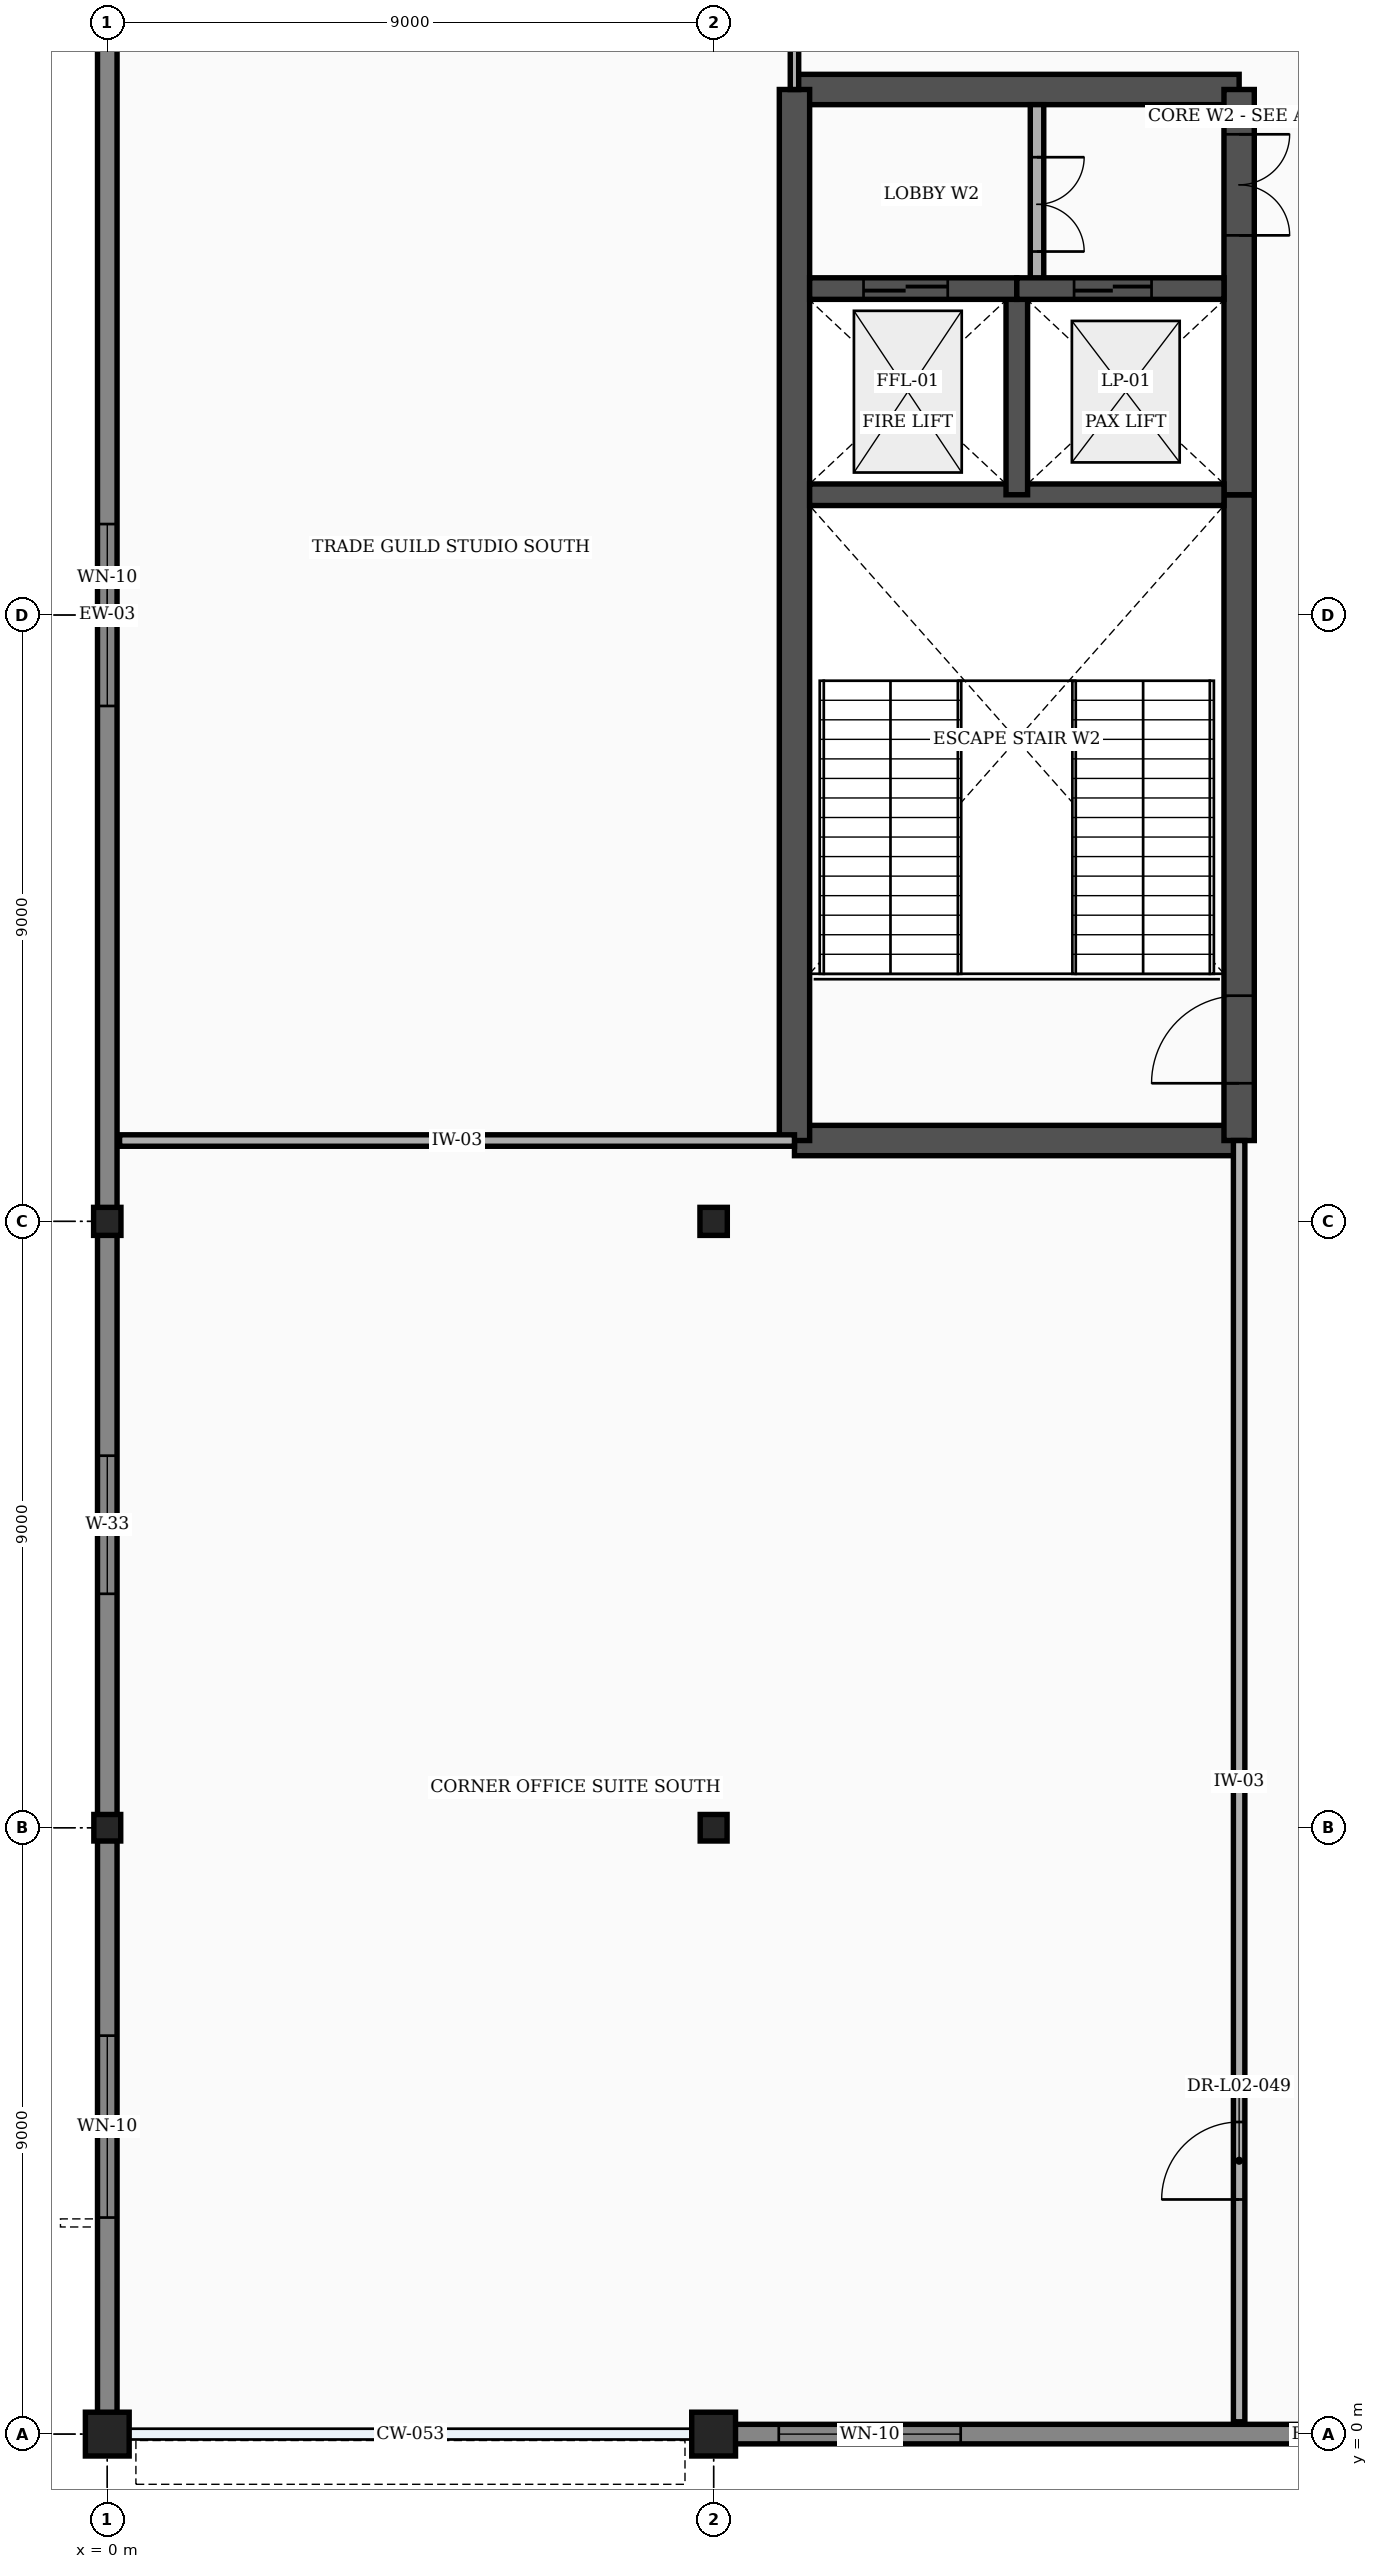
"""IFC4 building model, lengths in metres.
Left out: names, types, materials, properties, quantities, classifications, styles, units other than length and angle.
Written with IfcOpenShell. Run it as: python <this file> out.ifc"""

import sys

from ifc_helpers import new_model, si_unit, direction, frame, frame_2d, origin, origin_with_axes, origin_2d, place, context, subcontext, project, spatial, rectangle, i_section, extrude, element, fill, save


model = new_model("IFC4")
c1 = context("Model", 3, precision=1e-05, world=origin(), true_north=direction((0.0, 1.0)))
c2 = subcontext(c1, "Body", "Model", "MODEL_VIEW")
j1 = project(units=[si_unit("LENGTHUNIT", "METRE"), si_unit("PLANEANGLEUNIT", "RADIAN")], contexts=[c1])
p1 = place(None, origin())
s1 = spatial("IfcSite", under=j1, at=p1, CompositionType="ELEMENT")
p2 = place(p1, origin())
s2 = spatial("IfcBuilding", under=s1, at=p2, CompositionType="ELEMENT")
p3 = place(p2, frame((0.0, 0.0, 11.4)))
s3 = spatial("IfcBuildingStorey", under=s2, at=p3, CompositionType="ELEMENT", Elevation=11.4)
p4 = place(p3, origin_with_axes())
e1 = element("IfcColumn", 1, at=p4, inside=s3, PredefinedType="COLUMN", context=c2, shape_type="SweptSolid", body=[
    extrude(rectangle(XDim=0.65, YDim=0.65, at=origin_2d()), origin(), (0.0, 0.0, 1.0), 5.4),
])
p5 = place(p3, frame((0.0, 9.0, 0.0), z_axis=(0.0, 0.0, 1.0), x_axis=(1.0, 0.0, 0.0)))
e2 = element("IfcColumn", 2, at=p5, inside=s3, PredefinedType="COLUMN", context=c2, shape_type="SweptSolid", body=[
    extrude(i_section(OverallWidth=0.399, OverallDepth=0.394, WebThickness=0.023, FlangeThickness=0.037, at=origin_2d()), origin(), (0.0, 0.0, 1.0), 5.4),
])
p6 = place(p3, frame((0.0, 18.0, 0.0), z_axis=(0.0, 0.0, 1.0), x_axis=(1.0, 0.0, 0.0)))
e3 = element("IfcColumn", 3, at=p6, inside=s3, PredefinedType="COLUMN", context=c2, shape_type="SweptSolid", body=[
    extrude(i_section(OverallWidth=0.406, OverallDepth=0.416, WebThickness=0.03, FlangeThickness=0.048, at=origin_2d()), origin(), (0.0, 0.0, 1.0), 5.4),
])
p7 = place(p3, frame((9.0, 0.0, 0.0), z_axis=(0.0, 0.0, 1.0), x_axis=(1.0, 0.0, 0.0)))
e4 = element("IfcColumn", 4, at=p7, inside=s3, PredefinedType="COLUMN", context=c2, shape_type="SweptSolid", body=[
    extrude(rectangle(XDim=0.65, YDim=0.65, at=origin_2d()), origin(), (0.0, 0.0, 1.0), 5.4),
])
p8 = place(p3, frame((9.0, 9.0, 0.0), z_axis=(0.0, 0.0, 1.0), x_axis=(1.0, 0.0, 0.0)))
e5 = element("IfcColumn", 5, at=p8, inside=s3, PredefinedType="COLUMN", context=c2, shape_type="SweptSolid", body=[
    extrude(i_section(OverallWidth=0.399, OverallDepth=0.394, WebThickness=0.023, FlangeThickness=0.037, at=origin_2d()), origin(), (0.0, 0.0, 1.0), 5.4),
])
p9 = place(p3, frame((9.0, 18.0, 0.0), z_axis=(0.0, 0.0, 1.0), x_axis=(1.0, 0.0, 0.0)))
e6 = element("IfcColumn", 6, at=p9, inside=s3, PredefinedType="COLUMN", context=c2, shape_type="SweptSolid", body=[
    extrude(i_section(OverallWidth=0.406, OverallDepth=0.416, WebThickness=0.03, FlangeThickness=0.048, at=origin_2d()), origin(), (0.0, 0.0, 1.0), 5.4),
])
p10 = place(p3, frame((9.317, 0.0, 0.0), z_axis=(0.0, 0.0, 1.0), x_axis=(1.0, 0.0, 0.0)))
e7 = element("IfcWall", 7, at=p10, inside=s3, PredefinedType="STANDARD", context=c2, shape_type="SweptSolid", body=[
    extrude(rectangle(XDim=17.366, YDim=0.29, at=frame_2d((8.683, 0.0))), origin(), (0.0, 0.0, 1.0), 4.388),
])
p11 = place(p10, frame((0.65, 0.0, 0.85)))
e8 = element("IfcOpeningElement", 8, at=p11, cuts=e7, PredefinedType="OPENING", context=c2, shape_type="SweptSolid", body=[
    extrude(rectangle(XDim=2.7, YDim=2.4, at=frame_2d((1.35, 1.2))), frame((0.0, 0.157, 0.0), z_axis=(0.0, -1.0, 0.0), x_axis=(1.0, 0.0, 0.0)), (0.0, 0.0, 1.0), 0.314),
])
p12 = place(p3, frame((0.0, 0.317, 0.0), z_axis=(0.0, 0.0, 1.0), x_axis=(0.0, 1.0, 0.0)))
e9 = element("IfcWall", 9, at=p12, inside=s3, PredefinedType="STANDARD", context=c2, shape_type="SweptSolid", body=[
    extrude(rectangle(XDim=8.495, YDim=0.29, at=frame_2d((4.247, 0.0))), origin(), (0.0, 0.0, 1.0), 4.9),
])
p13 = place(p12, frame((2.897, 0.0, 0.85)))
e10 = element("IfcOpeningElement", 10, at=p13, cuts=e9, PredefinedType="OPENING", context=c2, shape_type="SweptSolid", body=[
    extrude(rectangle(XDim=2.7, YDim=2.4, at=frame_2d((1.35, 1.2))), frame((0.0, 0.157, 0.0), z_axis=(0.0, -1.0, 0.0), x_axis=(1.0, 0.0, 0.0)), (0.0, 0.0, 1.0), 0.314),
])
p14 = place(p3, frame((0.0, 9.188, 0.0), z_axis=(0.0, 0.0, 1.0), x_axis=(0.0, 1.0, 0.0)))
e11 = element("IfcWall", 11, at=p14, inside=s3, PredefinedType="STANDARD", context=c2, shape_type="SweptSolid", body=[
    extrude(rectangle(XDim=8.617, YDim=0.29, at=frame_2d((4.309, 0.0))), origin(), (0.0, 0.0, 1.0), 4.9),
])
p15 = place(p14, frame((3.284, 0.0, 0.85)))
e12 = element("IfcOpeningElement", 12, at=p15, cuts=e11, PredefinedType="OPENING", context=c2, shape_type="SweptSolid", body=[
    extrude(rectangle(XDim=2.05, YDim=1.9, at=frame_2d((1.025, 0.95))), frame((0.0, 0.157, 0.0), z_axis=(0.0, -1.0, 0.0), x_axis=(1.0, 0.0, 0.0)), (0.0, 0.0, 1.0), 0.314),
])
p16 = place(p3, frame((0.0, 18.194, 0.0), z_axis=(0.0, 0.0, 1.0), x_axis=(0.0, 1.0, 0.0)))
e13 = element("IfcWall", 13, at=p16, inside=s3, PredefinedType="STANDARD", context=c2, shape_type="SweptSolid", body=[
    extrude(rectangle(XDim=17.612, YDim=0.29, at=frame_2d((8.806, 0.0))), origin(), (0.0, 0.0, 1.0), 4.467),
])
p17 = place(p16, frame((7.456, 0.0, 0.85)))
e14 = element("IfcOpeningElement", 14, at=p17, cuts=e13, PredefinedType="OPENING", context=c2, shape_type="SweptSolid", body=[
    extrude(rectangle(XDim=2.7, YDim=2.4, at=frame_2d((1.35, 1.2))), frame((0.0, 0.157, 0.0), z_axis=(0.0, -1.0, 0.0), x_axis=(1.0, 0.0, 0.0)), (0.0, 0.0, 1.0), 0.314),
])
for number, where, z_axis, x_axis in (
    (15, (10.2, 19.2, 0.0), (0.0, 0.0, 1.0), (1.0, 0.0, 0.0)),
    (16, (10.2, 34.8, 0.0), (0.0, 0.0, 1.0), (1.0, 0.0, 0.0)),
):
    element("IfcWall", number, at=place(p3, frame(where, z_axis=z_axis, x_axis=x_axis)), inside=s3, PredefinedType="SHEAR", context=c2, shape_type="SweptSolid", body=[
        extrude(rectangle(XDim=6.6, YDim=0.45, at=frame_2d((3.3, 0.0))), origin(), (0.0, 0.0, 1.0), 5.15),
    ])
p18 = place(p3, frame((10.2, 19.2, 0.0), z_axis=(0.0, 0.0, 1.0), x_axis=(0.0, 1.0, 0.0)))
e17 = element("IfcWall", 17, at=p18, inside=s3, PredefinedType="SHEAR", context=c2, shape_type="SweptSolid", body=[
    extrude(rectangle(XDim=15.6, YDim=0.45, at=frame_2d((7.8, 0.0))), origin(), (0.0, 0.0, 1.0), 5.15),
])
p19 = place(p3, frame((16.8, 19.2, 0.0), z_axis=(0.0, 0.0, 1.0), x_axis=(0.0, 1.0, 0.0)))
e18 = element("IfcWall", 18, at=p19, inside=s3, PredefinedType="SHEAR", context=c2, shape_type="SweptSolid", body=[
    extrude(rectangle(XDim=9.585, YDim=0.45, at=frame_2d((4.792, 0.0))), origin(), (0.0, 0.0, 1.0), 5.15),
])
p20 = place(p19, frame((0.85, 0.0, 0.0)))
e19 = element("IfcOpeningElement", 19, at=p20, cuts=e18, PredefinedType="OPENING", context=c2, shape_type="SweptSolid", body=[
    extrude(rectangle(XDim=1.3, YDim=2.2, at=frame_2d((0.65, 1.1))), frame((0.0, 0.237, 0.0), z_axis=(0.0, -1.0, 0.0), x_axis=(1.0, 0.0, 0.0)), (0.0, 0.0, 1.0), 0.474),
])
p21 = place(p3, frame((16.8, 28.785, 0.0), z_axis=(0.0, 0.0, 1.0), x_axis=(0.0, 1.0, 0.0)))
e20 = element("IfcWall", 20, at=p21, inside=s3, PredefinedType="SHEAR", context=c2, shape_type="SweptSolid", body=[
    extrude(rectangle(XDim=6.015, YDim=0.45, at=frame_2d((3.008, 0.0))), origin(), (0.0, 0.0, 1.0), 5.15),
])
p22 = place(p21, frame((3.85, 0.0, 0.0)))
e21 = element("IfcOpeningElement", 21, at=p22, cuts=e20, PredefinedType="OPENING", context=c2, shape_type="SweptSolid", body=[
    extrude(rectangle(XDim=1.5, YDim=2.2, at=frame_2d((0.75, 1.1))), frame((0.0, 0.237, 0.0), z_axis=(0.0, -1.0, 0.0), x_axis=(1.0, 0.0, 0.0)), (0.0, 0.0, 1.0), 0.474),
])
p23 = place(p3, frame((10.425, 28.785, 0.0), z_axis=(0.0, 0.0, 1.0), x_axis=(1.0, 0.0, 0.0)))
e22 = element("IfcWall", 22, at=p23, inside=s3, PredefinedType="SHEAR", context=c2, shape_type="SweptSolid", body=[
    extrude(rectangle(XDim=6.15, YDim=0.32, at=frame_2d((3.075, 0.0))), origin(), (0.0, 0.0, 1.0), 5.15),
])
p24 = place(p3, frame((13.5, 28.785, 0.0), z_axis=(0.0, 0.0, 1.0), x_axis=(0.0, 1.0, 0.0)))
e23 = element("IfcWall", 23, at=p24, inside=s3, PredefinedType="SHEAR", context=c2, shape_type="SweptSolid", body=[
    extrude(rectangle(XDim=3.06, YDim=0.32, at=frame_2d((1.53, 0.0))), origin(), (0.0, 0.0, 1.0), 5.15),
])
p25 = place(p3, frame((13.8, 31.845, 0.0), z_axis=(0.0, 0.0, 1.0), x_axis=(0.0, 1.0, 0.0)))
e24 = element("IfcWall", 24, at=p25, inside=s3, PredefinedType="PARTITIONING", context=c2, shape_type="SweptSolid", body=[
    extrude(rectangle(XDim=2.73, YDim=0.2, at=frame_2d((1.365, 0.0))), origin(), (0.0, 0.0, 1.0), 5.15),
])
p26 = place(p25, frame((0.55, 0.0, 0.0)))
e25 = element("IfcOpeningElement", 25, at=p26, cuts=e24, PredefinedType="OPENING", context=c2, shape_type="SweptSolid", body=[
    extrude(rectangle(XDim=1.4, YDim=2.25, at=frame_2d((0.7, 1.125))), frame((0.0, 0.112, 0.0), z_axis=(0.0, -1.0, 0.0), x_axis=(1.0, 0.0, 0.0)), (0.0, 0.0, 1.0), 0.224),
])
p27 = place(p3, frame((10.425, 31.845, 0.0), z_axis=(0.0, 0.0, 1.0), x_axis=(1.0, 0.0, 0.0)))
e26 = element("IfcWall", 26, at=p27, inside=s3, PredefinedType="SHEAR", context=c2, shape_type="SweptSolid", body=[
    extrude(rectangle(XDim=3.075, YDim=0.32, at=frame_2d((1.538, 0.0))), origin(), (0.0, 0.0, 1.0), 5.15),
])
p28 = place(p27, frame((0.8, 0.0, 0.0)))
e27 = element("IfcOpeningElement", 27, at=p28, cuts=e26, PredefinedType="OPENING", context=c2, shape_type="SweptSolid", body=[
    extrude(rectangle(XDim=1.25, YDim=2.25, at=frame_2d((0.625, 1.125))), frame((0.0, 0.172, 0.0), z_axis=(0.0, -1.0, 0.0), x_axis=(1.0, 0.0, 0.0)), (0.0, 0.0, 1.0), 0.344),
])
p29 = place(p3, frame((13.5, 31.845, 0.0), z_axis=(0.0, 0.0, 1.0), x_axis=(1.0, 0.0, 0.0)))
e28 = element("IfcWall", 28, at=p29, inside=s3, PredefinedType="SHEAR", context=c2, shape_type="SweptSolid", body=[
    extrude(rectangle(XDim=3.075, YDim=0.32, at=frame_2d((1.538, 0.0))), origin(), (0.0, 0.0, 1.0), 5.15),
])
p30 = place(p29, frame((0.85, 0.0, 0.0)))
e29 = element("IfcOpeningElement", 29, at=p30, cuts=e28, PredefinedType="OPENING", context=c2, shape_type="SweptSolid", body=[
    extrude(rectangle(XDim=1.15, YDim=2.2, at=frame_2d((0.575, 1.1))), frame((0.0, 0.172, 0.0), z_axis=(0.0, -1.0, 0.0), x_axis=(1.0, 0.0, 0.0)), (0.0, 0.0, 1.0), 0.344),
])
p31 = place(p3, frame((10.2, 34.8, 0.0), z_axis=(0.0, 0.0, 1.0), x_axis=(0.0, 1.0, 0.0)))
e30 = element("IfcWall", 30, at=p31, inside=s3, PredefinedType="PARTITIONING", context=c2, shape_type="SweptSolid", body=[
    extrude(rectangle(XDim=2.0, YDim=0.125, at=frame_2d((1.0, 0.0))), origin(), (0.0, 0.0, 1.0), 5.15),
])
p32 = place(p3, frame((0.183, 19.2, 0.0), z_axis=(0.0, 0.0, 1.0), x_axis=(1.0, 0.0, 0.0)))
e31 = element("IfcWall", 31, at=p32, inside=s3, PredefinedType="PARTITIONING", context=c2, shape_type="SweptSolid", body=[
    extrude(rectangle(XDim=10.017, YDim=0.17, at=frame_2d((5.009, 0.0))), origin(), (0.0, 0.0, 1.0), 5.15),
])
p33 = place(p3, frame((16.8, 0.183, 0.0), z_axis=(0.0, 0.0, 1.0), x_axis=(0.0, 1.0, 0.0)))
e32 = element("IfcWall", 32, at=p33, inside=s3, PredefinedType="PARTITIONING", context=c2, shape_type="SweptSolid", body=[
    extrude(rectangle(XDim=19.017, YDim=0.17, at=frame_2d((9.509, 0.0))), origin(), (0.0, 0.0, 1.0), 5.15),
])
p34 = place(p33, frame((3.3, 0.0, 0.0)))
e33 = element("IfcOpeningElement", 33, at=p34, cuts=e32, PredefinedType="OPENING", context=c2, shape_type="SweptSolid", body=[
    extrude(rectangle(XDim=1.15, YDim=2.15, at=frame_2d((0.575, 1.075))), frame((0.0, 0.097, 0.0), z_axis=(0.0, -1.0, 0.0), x_axis=(1.0, 0.0, 0.0)), (0.0, 0.0, 1.0), 0.194),
])
p35 = place(p11, origin())
e34 = element("IfcWindow", 34, at=p35, inside=s3, PartitioningType="SINGLE_PANEL", PredefinedType="WINDOW", context=c2, shape_type="SweptSolid", body=[
    extrude(rectangle(XDim=2.7, YDim=2.4, at=frame_2d((1.35, 1.2))), frame((0.0, 0.03, 0.0), z_axis=(0.0, -1.0, 0.0), x_axis=(1.0, 0.0, 0.0)), (0.0, 0.0, 1.0), 0.06),
])
fill(e8, e34)
p36 = place(p13, origin())
e35 = element("IfcWindow", 35, at=p36, inside=s3, PartitioningType="SINGLE_PANEL", PredefinedType="WINDOW", context=c2, shape_type="SweptSolid", body=[
    extrude(rectangle(XDim=2.7, YDim=2.4, at=frame_2d((1.35, 1.2))), frame((0.0, 0.03, 0.0), z_axis=(0.0, -1.0, 0.0), x_axis=(1.0, 0.0, 0.0)), (0.0, 0.0, 1.0), 0.06),
])
fill(e10, e35)
p37 = place(p15, origin())
e36 = element("IfcWindow", 36, at=p37, inside=s3, PartitioningType="SINGLE_PANEL", PredefinedType="WINDOW", context=c2, shape_type="SweptSolid", body=[
    extrude(rectangle(XDim=2.05, YDim=1.9, at=frame_2d((1.025, 0.95))), frame((0.0, 0.03, 0.0), z_axis=(0.0, -1.0, 0.0), x_axis=(1.0, 0.0, 0.0)), (0.0, 0.0, 1.0), 0.06),
])
fill(e12, e36)
p38 = place(p17, origin())
e37 = element("IfcWindow", 37, at=p38, inside=s3, PartitioningType="SINGLE_PANEL", PredefinedType="WINDOW", context=c2, shape_type="SweptSolid", body=[
    extrude(rectangle(XDim=2.7, YDim=2.4, at=frame_2d((1.35, 1.2))), frame((0.0, 0.03, 0.0), z_axis=(0.0, -1.0, 0.0), x_axis=(1.0, 0.0, 0.0)), (0.0, 0.0, 1.0), 0.06),
])
fill(e14, e37)
p39 = place(p20, origin())
e38 = element("IfcDoor", 38, at=p39, inside=s3, OperationType="SINGLE_SWING_LEFT", PredefinedType="DOOR", context=c2, shape_type="SweptSolid", body=[
    extrude(rectangle(XDim=1.3, YDim=2.2, at=frame_2d((0.65, 1.1))), frame((0.0, 0.025, 0.0), z_axis=(0.0, -1.0, 0.0), x_axis=(1.0, 0.0, 0.0)), (0.0, 0.0, 1.0), 0.05),
])
fill(e19, e38)
p40 = place(p22, frame((1.5, 0.0, 0.0), z_axis=(0.0, 0.0, 1.0), x_axis=(-1.0, 0.0, 0.0)))
e39 = element("IfcDoor", 39, at=p40, inside=s3, OperationType="DOUBLE_DOOR_SINGLE_SWING", PredefinedType="DOOR", context=c2, shape_type="SweptSolid", body=[
    extrude(rectangle(XDim=1.5, YDim=2.2, at=frame_2d((0.75, 1.1))), frame((0.0, 0.025, 0.0), z_axis=(0.0, -1.0, 0.0), x_axis=(1.0, 0.0, 0.0)), (0.0, 0.0, 1.0), 0.05),
])
fill(e21, e39)
p41 = place(p26, frame((1.4, 0.0, 0.0), z_axis=(0.0, 0.0, 1.0), x_axis=(-1.0, 0.0, 0.0)))
e40 = element("IfcDoor", 40, at=p41, inside=s3, OperationType="DOUBLE_DOOR_SINGLE_SWING", PredefinedType="DOOR", context=c2, shape_type="SweptSolid", body=[
    extrude(rectangle(XDim=1.4, YDim=2.25, at=frame_2d((0.7, 1.125))), frame((0.0, 0.025, 0.0), z_axis=(0.0, -1.0, 0.0), x_axis=(1.0, 0.0, 0.0)), (0.0, 0.0, 1.0), 0.05),
])
fill(e25, e40)
p42 = place(p28, origin())
e41 = element("IfcDoor", 41, at=p42, inside=s3, OperationType="DOUBLE_DOOR_SLIDING", PredefinedType="DOOR", context=c2, shape_type="SweptSolid", body=[
    extrude(rectangle(XDim=1.25, YDim=2.25, at=frame_2d((0.625, 1.125))), frame((0.0, 0.025, 0.0), z_axis=(0.0, -1.0, 0.0), x_axis=(1.0, 0.0, 0.0)), (0.0, 0.0, 1.0), 0.05),
])
fill(e27, e41)
p43 = place(p30, origin())
e42 = element("IfcDoor", 42, at=p43, inside=s3, OperationType="DOUBLE_DOOR_SLIDING", PredefinedType="DOOR", context=c2, shape_type="SweptSolid", body=[
    extrude(rectangle(XDim=1.15, YDim=2.2, at=frame_2d((0.575, 1.1))), frame((0.0, 0.025, 0.0), z_axis=(0.0, -1.0, 0.0), x_axis=(1.0, 0.0, 0.0)), (0.0, 0.0, 1.0), 0.05),
])
fill(e29, e42)
p44 = place(p34, origin())
e43 = element("IfcDoor", 43, at=p44, inside=s3, OperationType="SINGLE_SWING_LEFT", PredefinedType="DOOR", context=c2, shape_type="SweptSolid", body=[
    extrude(rectangle(XDim=1.15, YDim=2.15, at=frame_2d((0.575, 1.075))), frame((0.0, 0.025, 0.0), z_axis=(0.0, -1.0, 0.0), x_axis=(1.0, 0.0, 0.0)), (0.0, 0.0, 1.0), 0.05),
])
fill(e33, e43)
save(model, sys.argv[1])
